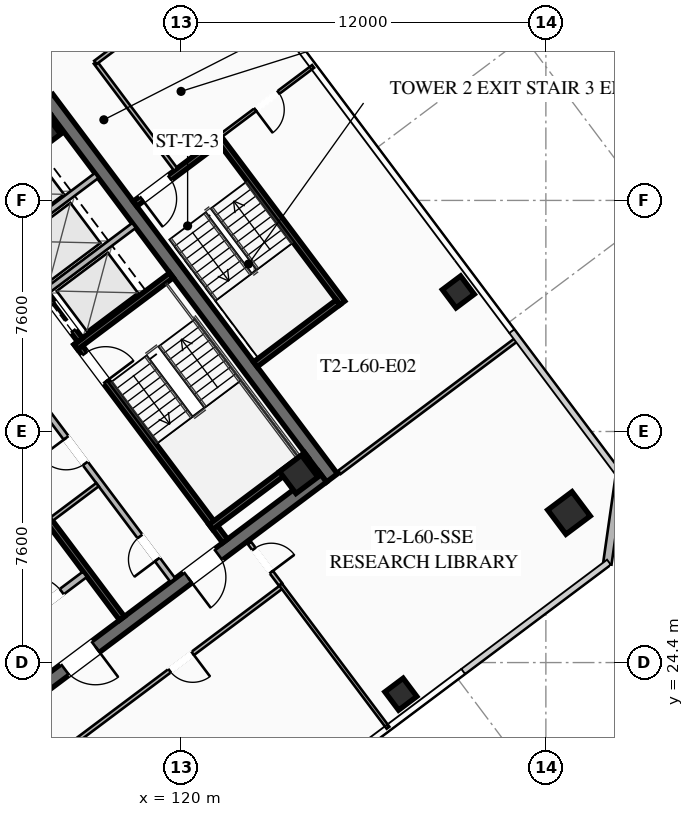
"""IFC4 building model, lengths in metres.
Left out: names, types, materials, properties, quantities, classifications, styles, units other than length and angle.
Written with IfcOpenShell. Run it as: python <this file> out.ifc"""

import sys

from ifc_helpers import new_model, si_unit, direction, frame, frame_2d, origin, origin_2d, place, context, subcontext, project, spatial, rectangle, hollow_rectangle, extrude, element, fill, save


model = new_model("IFC4")
c1 = context("Model", 3, precision=1e-05, world=origin(), true_north=direction((0.0, 1.0)))
c2 = subcontext(c1, "Body", "Model", "MODEL_VIEW")
j1 = project(units=[si_unit("LENGTHUNIT", "METRE"), si_unit("PLANEANGLEUNIT", "RADIAN")], contexts=[c1])
p1 = place(None, origin())
s1 = spatial("IfcSite", under=j1, at=p1, CompositionType="ELEMENT")
p2 = place(p1, origin())
s2 = spatial("IfcBuilding", under=s1, at=p2, CompositionType="ELEMENT")
p3 = place(p2, frame((0.0, 0.0, 221.95)))
s3 = spatial("IfcBuildingStorey", under=s2, at=p3, CompositionType="ELEMENT", Elevation=221.95)
p4 = place(p3, frame((115.604, 42.953, 0.0), z_axis=(0.0, 0.0, 1.0), x_axis=(0.600005007985, -0.799996243986, 0.0)))
e1 = element("IfcWall", 1, at=p4, inside=s3, PredefinedType="SHEAR", context=c2, shape_type="SweptSolid", body=[
    extrude(rectangle(XDim=15.6, YDim=0.45, at=frame_2d((7.8, 0.0))), origin(), (0.0, 0.0, 1.0), 3.55),
])
p5 = place(p3, frame((124.649, 30.518, 0.0), z_axis=(0.0, 0.0, 1.0), x_axis=(-0.8, -0.6, 0.0)))
e2 = element("IfcWall", 2, at=p5, inside=s3, PredefinedType="SHEAR", context=c2, shape_type="SweptSolid", body=[
    extrude(rectangle(XDim=15.26, YDim=0.45, at=frame_2d((7.63, 0.0))), origin(), (0.0, 0.0, 1.0), 3.55),
])
p6 = place(p5, frame((9.33, 0.0, 0.0)))
e3 = element("IfcOpeningElement", 3, at=p6, cuts=e2, PredefinedType="OPENING", context=c2, shape_type="SweptSolid", body=[
    extrude(rectangle(XDim=1.25, YDim=2.25, at=frame_2d((0.625, 1.125))), frame((0.0, 0.235, 0.0), z_axis=(0.0, -1.0, 0.0), x_axis=(1.0, 0.0, 0.0)), (0.0, 0.0, 1.0), 0.47),
])
p7 = place(p5, frame((4.28, 0.0, 0.0)))
e4 = element("IfcOpeningElement", 4, at=p7, cuts=e2, PredefinedType="OPENING", context=c2, shape_type="SweptSolid", body=[
    extrude(rectangle(XDim=1.25, YDim=2.25, at=frame_2d((0.625, 1.125))), frame((0.0, 0.235, 0.0), z_axis=(0.0, -1.0, 0.0), x_axis=(1.0, 0.0, 0.0)), (0.0, 0.0, 1.0), 0.47),
])
for number, where, z_axis, x_axis in (
    (5, (123.87, 30.59, 0.0), (0.0, 0.0, 1.0), (0.8, 0.6, 0.0)),
    (6, (115.41, 41.87, 0.0), (0.0, 0.0, 1.0), (0.8, 0.6, 0.0)),
):
    element("IfcColumn", number, at=place(p3, frame(where, z_axis=z_axis, x_axis=x_axis)), inside=s3, PredefinedType="COLUMN", context=c2, shape_type="SweptSolid", body=[
        extrude(hollow_rectangle(XDim=0.9, YDim=0.9, WallThickness=0.04, at=origin_2d()), origin(), (0.0, 0.0, 1.0), 3.37),
    ])
p8 = place(p3, frame((132.76, 29.32, 0.0), z_axis=(0.0, 0.0, 1.0), x_axis=(0.799999996291, 0.600000004945, 0.0)))
e7 = element("IfcColumn", 7, at=p8, inside=s3, PredefinedType="COLUMN", context=c2, shape_type="SweptSolid", body=[
    extrude(hollow_rectangle(XDim=1.0, YDim=1.0, WallThickness=0.04, at=origin_2d()), origin(), (0.0, 0.0, 1.0), 3.37),
])
for number, where, z_axis, x_axis in (
    (8, (127.23, 23.36, 0.0), (0.0, 0.0, 1.0), (0.8, 0.6, 0.0)),
    (9, (129.12, 36.59, 0.0), (0.0, 0.0, 1.0), (0.8, 0.6, 0.0)),
):
    element("IfcColumn", number, at=place(p3, frame(where, z_axis=z_axis, x_axis=x_axis)), inside=s3, PredefinedType="COLUMN", context=c2, shape_type="SweptSolid", body=[
        extrude(hollow_rectangle(XDim=0.75, YDim=0.75, WallThickness=0.032, at=origin_2d()), origin(), (0.0, 0.0, 1.0), 3.37),
    ])
p9 = place(p3, frame((134.44, 30.58, 0.0), z_axis=(0.0, 0.0, 1.0), x_axis=(-0.14138683146, -0.989954425158, 0.0)))
e10 = element("IfcWall", 10, at=p9, inside=s3, PredefinedType="SOLIDWALL", context=c2, shape_type="SweptSolid", body=[
    extrude(rectangle(XDim=2.97, YDim=0.28, at=frame_2d((1.485, 0.0))), origin(), (0.0, 0.0, 1.0), 3.37),
])
p10 = place(p3, frame((116.56, 34.92, 0.0), z_axis=(0.0, 0.0, 1.0), x_axis=(0.59999041401, -0.800007189403, 0.0)))
e11 = element("IfcWall", 11, at=p10, inside=s3, PredefinedType="SHEAR", context=c2, shape_type="SweptSolid", body=[
    extrude(rectangle(XDim=8.15, YDim=0.2, at=frame_2d((4.075, 0.0))), origin(), (0.0, 0.0, 1.0), 3.37),
])
p11 = place(p10, frame((0.45, 0.0, 0.0)))
e12 = element("IfcOpeningElement", 12, at=p11, cuts=e11, PredefinedType="OPENING", context=c2, shape_type="SweptSolid", body=[
    extrude(rectangle(XDim=1.15, YDim=2.2, at=frame_2d((0.575, 1.1))), frame((0.0, 0.11, 0.0), z_axis=(0.0, -1.0, 0.0), x_axis=(1.0, 0.0, 0.0)), (0.0, 0.0, 1.0), 0.22),
])
for number, where, z_axis, x_axis in (
    (13, (116.54, 34.78, 0.0), (0.0, 0.0, 1.0), (0.8, 0.6, 0.0)),
    (14, (120.98, 28.86, 0.0), (0.0, 0.0, 1.0), (0.8, 0.6, 0.0)),
):
    element("IfcWall", number, at=place(p3, frame(where, z_axis=z_axis, x_axis=x_axis)), inside=s3, PredefinedType="SHEAR", context=c2, shape_type="SweptSolid", body=[
        extrude(rectangle(XDim=3.93, YDim=0.2, at=frame_2d((1.965, 0.0))), origin(), (0.0, 0.0, 1.0), 3.37),
    ])
p12 = place(p3, frame((118.058, 25.856, 0.0), z_axis=(0.0, 0.0, 1.0), x_axis=(-0.600002657301, 0.799998007018, 0.0)))
e15 = element("IfcWall", 15, at=p12, inside=s3, PredefinedType="SHEAR", context=c2, shape_type="SweptSolid", body=[
    extrude(rectangle(XDim=14.7, YDim=0.2, at=frame_2d((7.35, 0.0))), origin(), (0.0, 0.0, 1.0), 3.37),
])
p13 = place(p3, frame((114.316, 25.412, 0.0), z_axis=(0.0, 0.0, 1.0), x_axis=(0.800018601094, 0.59997519774, 0.0)))
e16 = element("IfcWall", 16, at=p13, inside=s3, PredefinedType="SOLIDWALL", context=c2, shape_type="SweptSolid", body=[
    extrude(rectangle(XDim=3.15, YDim=0.22, at=frame_2d((1.575, 0.0))), origin(), (0.0, 0.0, 1.0), 2.723),
])
p14 = place(p13, frame((0.95, 0.0, 0.0)))
e17 = element("IfcOpeningElement", 17, at=p14, cuts=e16, PredefinedType="OPENING", context=c2, shape_type="SweptSolid", body=[
    extrude(rectangle(XDim=1.25, YDim=2.25, at=frame_2d((0.625, 1.125))), frame((0.0, 0.12, 0.0), z_axis=(0.0, -1.0, 0.0), x_axis=(1.0, 0.0, 0.0)), (0.0, 0.0, 1.0), 0.24),
])
p15 = place(p3, frame((112.75, 40.25, 0.0), z_axis=(0.0, 0.0, 1.0), x_axis=(0.599994036198, -0.800004472816, 0.0)))
e18 = element("IfcWall", 18, at=p15, inside=s3, PredefinedType="SHEAR", context=c2, shape_type="SweptSolid", body=[
    extrude(rectangle(XDim=6.55, YDim=0.2, at=frame_2d((3.275, 0.0))), origin(), (0.0, 0.0, 1.0), 3.37),
])
p16 = place(p15, frame((5.075, 0.0, 0.0)))
e19 = element("IfcOpeningElement", 19, at=p16, cuts=e18, PredefinedType="OPENING", context=c2, shape_type="SweptSolid", body=[
    extrude(rectangle(XDim=1.1, YDim=2.2, at=frame_2d((0.55, 1.1))), frame((0.0, 0.11, 0.0), z_axis=(0.0, -1.0, 0.0), x_axis=(1.0, 0.0, 0.0)), (0.0, 0.0, 1.0), 0.22),
])
p17 = place(p15, frame((3.025, 0.0, 0.0)))
e20 = element("IfcOpeningElement", 20, at=p17, cuts=e18, PredefinedType="OPENING", context=c2, shape_type="SweptSolid", body=[
    extrude(rectangle(XDim=1.1, YDim=2.2, at=frame_2d((0.55, 1.1))), frame((0.0, 0.11, 0.0), z_axis=(0.0, -1.0, 0.0), x_axis=(1.0, 0.0, 0.0)), (0.0, 0.0, 1.0), 0.22),
])
p18 = place(p15, frame((1.025, 0.0, 0.0)))
e21 = element("IfcOpeningElement", 21, at=p18, cuts=e18, PredefinedType="OPENING", context=c2, shape_type="SweptSolid", body=[
    extrude(rectangle(XDim=1.1, YDim=2.2, at=frame_2d((0.55, 1.1))), frame((0.0, 0.11, 0.0), z_axis=(0.0, -1.0, 0.0), x_axis=(1.0, 0.0, 0.0)), (0.0, 0.0, 1.0), 0.22),
])
for number, where, z_axis, x_axis in (
    (22, (115.59, 36.63, 0.0), (0.0, 0.0, 1.0), (0.8, 0.6, 0.0)),
    (23, (114.36, 38.27, 0.0), (0.0, 0.0, 1.0), (0.8, 0.6, 0.0)),
):
    element("IfcWall", number, at=place(p3, frame(where, z_axis=z_axis, x_axis=x_axis)), inside=s3, PredefinedType="SOLIDWALL", context=c2, shape_type="SweptSolid", body=[
        extrude(rectangle(XDim=3.58, YDim=0.2, at=frame_2d((1.79, 0.0))), origin(), (0.0, 0.0, 1.0), 3.37),
    ])
p19 = place(p3, frame((119.73, 27.11, 0.0), z_axis=(0.0, 0.0, 1.0), x_axis=(-0.600005580459, 0.799995814625, 0.0)))
e24 = element("IfcWall", 24, at=p19, inside=s3, PredefinedType="SOLIDWALL", context=c2, shape_type="SweptSolid", body=[
    extrude(rectangle(XDim=7.0, YDim=0.2, at=frame_2d((3.5, 0.0))), origin(), (0.0, 0.0, 1.0), 2.723),
])
p20 = place(p19, frame((0.85, 0.0, 0.0)))
e25 = element("IfcOpeningElement", 25, at=p20, cuts=e24, PredefinedType="OPENING", context=c2, shape_type="SweptSolid", body=[
    extrude(rectangle(XDim=0.95, YDim=2.05, at=frame_2d((0.475, 1.025))), frame((0.0, 0.11, 0.0), z_axis=(0.0, -1.0, 0.0), x_axis=(1.0, 0.0, 0.0)), (0.0, 0.0, 1.0), 0.22),
])
p21 = place(p19, frame((4.8, 0.0, 0.0)))
e26 = element("IfcOpeningElement", 26, at=p21, cuts=e24, PredefinedType="OPENING", context=c2, shape_type="SweptSolid", body=[
    extrude(rectangle(XDim=1.05, YDim=2.2, at=frame_2d((0.525, 1.1))), frame((0.0, 0.11, 0.0), z_axis=(0.0, -1.0, 0.0), x_axis=(1.0, 0.0, 0.0)), (0.0, 0.0, 1.0), 0.22),
])
p22 = place(p3, frame((115.746, 29.122, 0.0), z_axis=(0.0, 0.0, 1.0), x_axis=(0.8, 0.6, 0.0)))
e27 = element("IfcWall", 27, at=p22, inside=s3, PredefinedType="PARTITIONING", context=c2, shape_type="SweptSolid", body=[
    extrude(rectangle(XDim=1.88, YDim=0.135, at=frame_2d((0.94, 0.0))), origin(), (0.0, 0.0, 1.0), 2.723),
])
p23 = place(p3, frame((125.304, 36.228, 0.0), z_axis=(0.0, 0.0, 1.0), x_axis=(-0.59998851072, 0.800008616831, 0.0)))
e28 = element("IfcWall", 28, at=p23, inside=s3, PredefinedType="SHEAR", context=c2, shape_type="SweptSolid", body=[
    extrude(rectangle(XDim=6.8, YDim=0.2, at=frame_2d((3.4, 0.0))), origin(), (0.0, 0.0, 1.0), 3.37),
])
p24 = place(p3, frame((121.204, 41.528, 0.0), z_axis=(0.0, 0.0, 1.0), x_axis=(-0.800017232136, -0.599977023131, 0.0)))
e29 = element("IfcWall", 29, at=p24, inside=s3, PredefinedType="SHEAR", context=c2, shape_type="SweptSolid", body=[
    extrude(rectangle(XDim=3.4, YDim=0.2, at=frame_2d((1.7, 0.0))), origin(), (0.0, 0.0, 1.0), 3.37),
])
p25 = place(p24, frame((1.975, 0.0, 0.0)))
e30 = element("IfcOpeningElement", 30, at=p25, cuts=e29, PredefinedType="OPENING", context=c2, shape_type="SweptSolid", body=[
    extrude(rectangle(XDim=1.15, YDim=2.2, at=frame_2d((0.575, 1.1))), frame((0.0, 0.11, 0.0), z_axis=(0.0, -1.0, 0.0), x_axis=(1.0, 0.0, 0.0)), (0.0, 0.0, 1.0), 0.22),
])
p26 = place(p3, frame((122.444, 34.208, 0.0), z_axis=(0.0, 0.0, 1.0), x_axis=(0.79999138319, 0.600011488909, 0.0)))
e31 = element("IfcWall", 31, at=p26, inside=s3, PredefinedType="SHEAR", context=c2, shape_type="SweptSolid", body=[
    extrude(rectangle(XDim=3.4, YDim=0.2, at=frame_2d((1.7, 0.0))), origin(), (0.0, 0.0, 1.0), 3.37),
])
p27 = place(p3, frame((119.824, 40.618, 0.0), z_axis=(0.0, 0.0, 1.0), x_axis=(-0.599982243973, 0.800013316712, 0.0)))
e32 = element("IfcWall", 32, at=p27, inside=s3, PredefinedType="PARTITIONING", context=c2, shape_type="SweptSolid", body=[
    extrude(rectangle(XDim=4.4, YDim=0.135, at=frame_2d((2.2, 0.0))), origin(), (0.0, 0.0, 1.0), 2.723),
])
p28 = place(p3, frame((98.696, 34.522, 0.0), z_axis=(0.0, 0.0, 1.0), x_axis=(0.799998778269, 0.600001628972, 0.0)))
e33 = element("IfcWall", 33, at=p28, inside=s3, PredefinedType="PARTITIONING", context=c2, shape_type="SweptSolid", body=[
    extrude(rectangle(XDim=23.98, YDim=0.135, at=frame_2d((11.99, 0.0))), origin(), (0.0, 0.0, 1.0), 2.723),
])
p29 = place(p28, frame((0.3, 0.0, 0.0)))
e34 = element("IfcOpeningElement", 34, at=p29, cuts=e33, PredefinedType="OPENING", context=c2, shape_type="SweptSolid", body=[
    extrude(rectangle(XDim=0.95, YDim=2.05, at=frame_2d((0.475, 1.025))), frame((0.0, 0.077, 0.0), z_axis=(0.0, -1.0, 0.0), x_axis=(1.0, 0.0, 0.0)), (0.0, 0.0, 1.0), 0.155),
])
p30 = place(p28, frame((10.503, 0.0, 0.0)))
e35 = element("IfcOpeningElement", 35, at=p30, cuts=e33, PredefinedType="OPENING", context=c2, shape_type="SweptSolid", body=[
    extrude(rectangle(XDim=0.95, YDim=2.05, at=frame_2d((0.475, 1.025))), frame((0.0, 0.077, 0.0), z_axis=(0.0, -1.0, 0.0), x_axis=(1.0, 0.0, 0.0)), (0.0, 0.0, 1.0), 0.155),
])
p31 = place(p28, frame((14.308, 0.0, 0.0)))
e36 = element("IfcOpeningElement", 36, at=p31, cuts=e33, PredefinedType="OPENING", context=c2, shape_type="SweptSolid", body=[
    extrude(rectangle(XDim=0.95, YDim=2.05, at=frame_2d((0.475, 1.025))), frame((0.0, 0.077, 0.0), z_axis=(0.0, -1.0, 0.0), x_axis=(1.0, 0.0, 0.0)), (0.0, 0.0, 1.0), 0.155),
])
p32 = place(p28, frame((22.73, 0.0, 0.0)))
e37 = element("IfcOpeningElement", 37, at=p32, cuts=e33, PredefinedType="OPENING", context=c2, shape_type="SweptSolid", body=[
    extrude(rectangle(XDim=0.95, YDim=2.05, at=frame_2d((0.475, 1.025))), frame((0.0, 0.077, 0.0), z_axis=(0.0, -1.0, 0.0), x_axis=(1.0, 0.0, 0.0)), (0.0, 0.0, 1.0), 0.155),
])
p33 = place(p3, frame((123.322, 26.904, 0.0), z_axis=(0.0, 0.0, 1.0), x_axis=(-0.799996127317, -0.600005163543, 0.0)))
e38 = element("IfcWall", 38, at=p33, inside=s3, PredefinedType="PARTITIONING", context=c2, shape_type="SweptSolid", body=[
    extrude(rectangle(XDim=15.13, YDim=0.135, at=frame_2d((7.565, 0.0))), origin(), (0.0, 0.0, 1.0), 2.723),
])
p34 = place(p33, frame((13.8, 0.0, 0.0)))
e39 = element("IfcOpeningElement", 39, at=p34, cuts=e38, PredefinedType="OPENING", context=c2, shape_type="SweptSolid", body=[
    extrude(rectangle(XDim=0.95, YDim=2.05, at=frame_2d((0.475, 1.025))), frame((0.0, 0.077, 0.0), z_axis=(0.0, -1.0, 0.0), x_axis=(1.0, 0.0, 0.0)), (0.0, 0.0, 1.0), 0.155),
])
p35 = place(p33, frame((3.672, 0.0, 0.0)))
e40 = element("IfcOpeningElement", 40, at=p35, cuts=e38, PredefinedType="OPENING", context=c2, shape_type="SweptSolid", body=[
    extrude(rectangle(XDim=0.95, YDim=2.05, at=frame_2d((0.475, 1.025))), frame((0.0, 0.077, 0.0), z_axis=(0.0, -1.0, 0.0), x_axis=(1.0, 0.0, 0.0)), (0.0, 0.0, 1.0), 0.155),
])
p36 = place(p3, frame((122.248, 28.336, 0.0), z_axis=(0.0, 0.0, 1.0), x_axis=(0.599977154362, -0.800017133719, 0.0)))
e41 = element("IfcWall", 41, at=p36, inside=s3, PredefinedType="PARTITIONING", context=c2, shape_type="SweptSolid", body=[
    extrude(rectangle(XDim=1.71, YDim=0.135, at=frame_2d((0.855, 0.0))), origin(), (0.0, 0.0, 1.0), 2.723),
])
p37 = place(p36, frame((0.25, 0.0, 0.0)))
e42 = element("IfcOpeningElement", 42, at=p37, cuts=e41, PredefinedType="OPENING", context=c2, shape_type="SweptSolid", body=[
    extrude(rectangle(XDim=0.95, YDim=2.05, at=frame_2d((0.475, 1.025))), frame((0.0, 0.077, 0.0), z_axis=(0.0, -1.0, 0.0), x_axis=(1.0, 0.0, 0.0)), (0.0, 0.0, 1.0), 0.155),
])
p38 = place(p3, frame((126.808, 22.256, 0.0), z_axis=(0.0, 0.0, 1.0), x_axis=(-0.600026527508, 0.799980103682, 0.0)))
e43 = element("IfcWall", 43, at=p38, inside=s3, PredefinedType="PARTITIONING", context=c2, shape_type="SweptSolid", body=[
    extrude(rectangle(XDim=5.89, YDim=0.11, at=frame_2d((2.945, 0.0))), origin(), (0.0, 0.0, 1.0), 2.723),
])
p39 = place(p3, frame((121.704, 47.528, 0.0), z_axis=(0.0, 0.0, 1.0), x_axis=(-0.799989629485, -0.600013827105, 0.0)))
e44 = element("IfcWall", 44, at=p39, inside=s3, PredefinedType="PARTITIONING", context=c2, shape_type="SweptSolid", body=[
    extrude(rectangle(XDim=5.65, YDim=0.135, at=frame_2d((2.825, 0.0))), origin(), (0.0, 0.0, 1.0), 2.723),
])
p40 = place(p39, frame((2.7, 0.0, 0.0)))
e45 = element("IfcOpeningElement", 45, at=p40, cuts=e44, PredefinedType="OPENING", context=c2, shape_type="SweptSolid", body=[
    extrude(rectangle(XDim=0.95, YDim=2.05, at=frame_2d((0.475, 1.025))), frame((0.0, 0.077, 0.0), z_axis=(0.0, -1.0, 0.0), x_axis=(1.0, 0.0, 0.0)), (0.0, 0.0, 1.0), 0.155),
])
p41 = place(p3, frame((125.208, 30.656, 0.0), z_axis=(0.0, 0.0, 1.0), x_axis=(0.79999199534, 0.600010672732, 0.0)))
e46 = element("IfcWall", 46, at=p41, inside=s3, PredefinedType="PARTITIONING", context=c2, shape_type="SweptSolid", body=[
    extrude(rectangle(XDim=7.32, YDim=0.135, at=frame_2d((3.66, 0.0))), origin(), (0.0, 0.0, 1.0), 2.723),
])
p42 = place(p3, frame((124.344, 44.008, 0.0), z_axis=(0.0, 0.0, 1.0), x_axis=(-0.8, -0.6, 0.0)))
e47 = element("IfcWall", 47, at=p42, inside=s3, PredefinedType="PARTITIONING", context=c2, shape_type="SweptSolid", body=[
    extrude(rectangle(XDim=3.8, YDim=0.11, at=frame_2d((1.9, 0.0))), origin(), (0.0, 0.0, 1.0), 2.723),
])
p43 = place(p42, frame((1.425, 0.0, 0.0)))
e48 = element("IfcOpeningElement", 48, at=p43, cuts=e47, PredefinedType="OPENING", context=c2, shape_type="SweptSolid", body=[
    extrude(rectangle(XDim=0.95, YDim=2.05, at=frame_2d((0.475, 1.025))), frame((0.0, 0.065, 0.0), z_axis=(0.0, -1.0, 0.0), x_axis=(1.0, 0.0, 0.0)), (0.0, 0.0, 1.0), 0.13),
])
p44 = place(p6, origin())
e49 = element("IfcDoor", 49, at=p44, inside=s3, OperationType="SINGLE_SWING_LEFT", PredefinedType="DOOR", context=c2, shape_type="SweptSolid", body=[
    extrude(rectangle(XDim=1.25, YDim=2.25, at=frame_2d((0.625, 1.125))), frame((0.0, 0.025, 0.0), z_axis=(0.0, -1.0, 0.0), x_axis=(1.0, 0.0, 0.0)), (0.0, 0.0, 1.0), 0.05),
])
fill(e3, e49)
p45 = place(p7, origin())
e50 = element("IfcDoor", 50, at=p45, inside=s3, OperationType="SINGLE_SWING_RIGHT", PredefinedType="DOOR", context=c2, shape_type="SweptSolid", body=[
    extrude(rectangle(XDim=1.25, YDim=2.25, at=frame_2d((0.625, 1.125))), frame((0.0, 0.025, 0.0), z_axis=(0.0, -1.0, 0.0), x_axis=(1.0, 0.0, 0.0)), (0.0, 0.0, 1.0), 0.05),
])
fill(e4, e50)
p46 = place(p11, origin())
e51 = element("IfcDoor", 51, at=p46, inside=s3, OperationType="SINGLE_SWING_RIGHT", PredefinedType="DOOR", context=c2, shape_type="SweptSolid", body=[
    extrude(rectangle(XDim=1.15, YDim=2.2, at=frame_2d((0.575, 1.1))), frame((0.0, 0.025, 0.0), z_axis=(0.0, -1.0, 0.0), x_axis=(1.0, 0.0, 0.0)), (0.0, 0.0, 1.0), 0.05),
])
fill(e12, e51)
p47 = place(p14, origin())
e52 = element("IfcDoor", 52, at=p47, inside=s3, OperationType="SINGLE_SWING_LEFT", PredefinedType="DOOR", context=c2, shape_type="SweptSolid", body=[
    extrude(rectangle(XDim=1.25, YDim=2.25, at=frame_2d((0.625, 1.125))), frame((0.0, 0.025, 0.0), z_axis=(0.0, -1.0, 0.0), x_axis=(1.0, 0.0, 0.0)), (0.0, 0.0, 1.0), 0.05),
])
fill(e17, e52)
p48 = place(p20, origin())
e53 = element("IfcDoor", 53, at=p48, inside=s3, OperationType="SINGLE_SWING_LEFT", PredefinedType="DOOR", context=c2, shape_type="SweptSolid", body=[
    extrude(rectangle(XDim=0.95, YDim=2.05, at=frame_2d((0.475, 1.025))), frame((0.0, 0.025, 0.0), z_axis=(0.0, -1.0, 0.0), x_axis=(1.0, 0.0, 0.0)), (0.0, 0.0, 1.0), 0.05),
])
fill(e25, e53)
p49 = place(p21, origin())
e54 = element("IfcDoor", 54, at=p49, inside=s3, OperationType="SINGLE_SWING_RIGHT", PredefinedType="DOOR", context=c2, shape_type="SweptSolid", body=[
    extrude(rectangle(XDim=1.05, YDim=2.2, at=frame_2d((0.525, 1.1))), frame((0.0, 0.025, 0.0), z_axis=(0.0, -1.0, 0.0), x_axis=(1.0, 0.0, 0.0)), (0.0, 0.0, 1.0), 0.05),
])
fill(e26, e54)
p50 = place(p25, origin())
e55 = element("IfcDoor", 55, at=p50, inside=s3, OperationType="SINGLE_SWING_RIGHT", PredefinedType="DOOR", context=c2, shape_type="SweptSolid", body=[
    extrude(rectangle(XDim=1.15, YDim=2.2, at=frame_2d((0.575, 1.1))), frame((0.0, 0.025, 0.0), z_axis=(0.0, -1.0, 0.0), x_axis=(1.0, 0.0, 0.0)), (0.0, 0.0, 1.0), 0.05),
])
fill(e30, e55)
p51 = place(p35, origin())
e56 = element("IfcDoor", 56, at=p51, inside=s3, OperationType="SINGLE_SWING_LEFT", PredefinedType="DOOR", context=c2, shape_type="SweptSolid", body=[
    extrude(rectangle(XDim=0.95, YDim=2.05, at=frame_2d((0.475, 1.025))), frame((0.0, 0.025, 0.0), z_axis=(0.0, -1.0, 0.0), x_axis=(1.0, 0.0, 0.0)), (0.0, 0.0, 1.0), 0.05),
])
fill(e40, e56)
p52 = place(p37, origin())
e57 = element("IfcDoor", 57, at=p52, inside=s3, OperationType="SINGLE_SWING_RIGHT", PredefinedType="DOOR", context=c2, shape_type="SweptSolid", body=[
    extrude(rectangle(XDim=0.95, YDim=2.05, at=frame_2d((0.475, 1.025))), frame((0.0, 0.025, 0.0), z_axis=(0.0, -1.0, 0.0), x_axis=(1.0, 0.0, 0.0)), (0.0, 0.0, 1.0), 0.05),
])
fill(e42, e57)
p53 = place(p43, origin())
e58 = element("IfcDoor", 58, at=p53, inside=s3, OperationType="SINGLE_SWING_RIGHT", PredefinedType="DOOR", context=c2, shape_type="SweptSolid", body=[
    extrude(rectangle(XDim=0.95, YDim=2.05, at=frame_2d((0.475, 1.025))), frame((0.0, 0.025, 0.0), z_axis=(0.0, -1.0, 0.0), x_axis=(1.0, 0.0, 0.0)), (0.0, 0.0, 1.0), 0.05),
])
fill(e48, e58)
p54 = place(p16, origin())
e59 = element("IfcDoor", 59, at=p54, inside=s3, OperationType="SLIDING_TO_LEFT", PredefinedType="DOOR", context=c2, shape_type="SweptSolid", body=[
    extrude(rectangle(XDim=1.1, YDim=2.2, at=frame_2d((0.55, 1.1))), frame((0.0, 0.025, 0.0), z_axis=(0.0, -1.0, 0.0), x_axis=(1.0, 0.0, 0.0)), (0.0, 0.0, 1.0), 0.05),
])
fill(e19, e59)
save(model, sys.argv[1])
